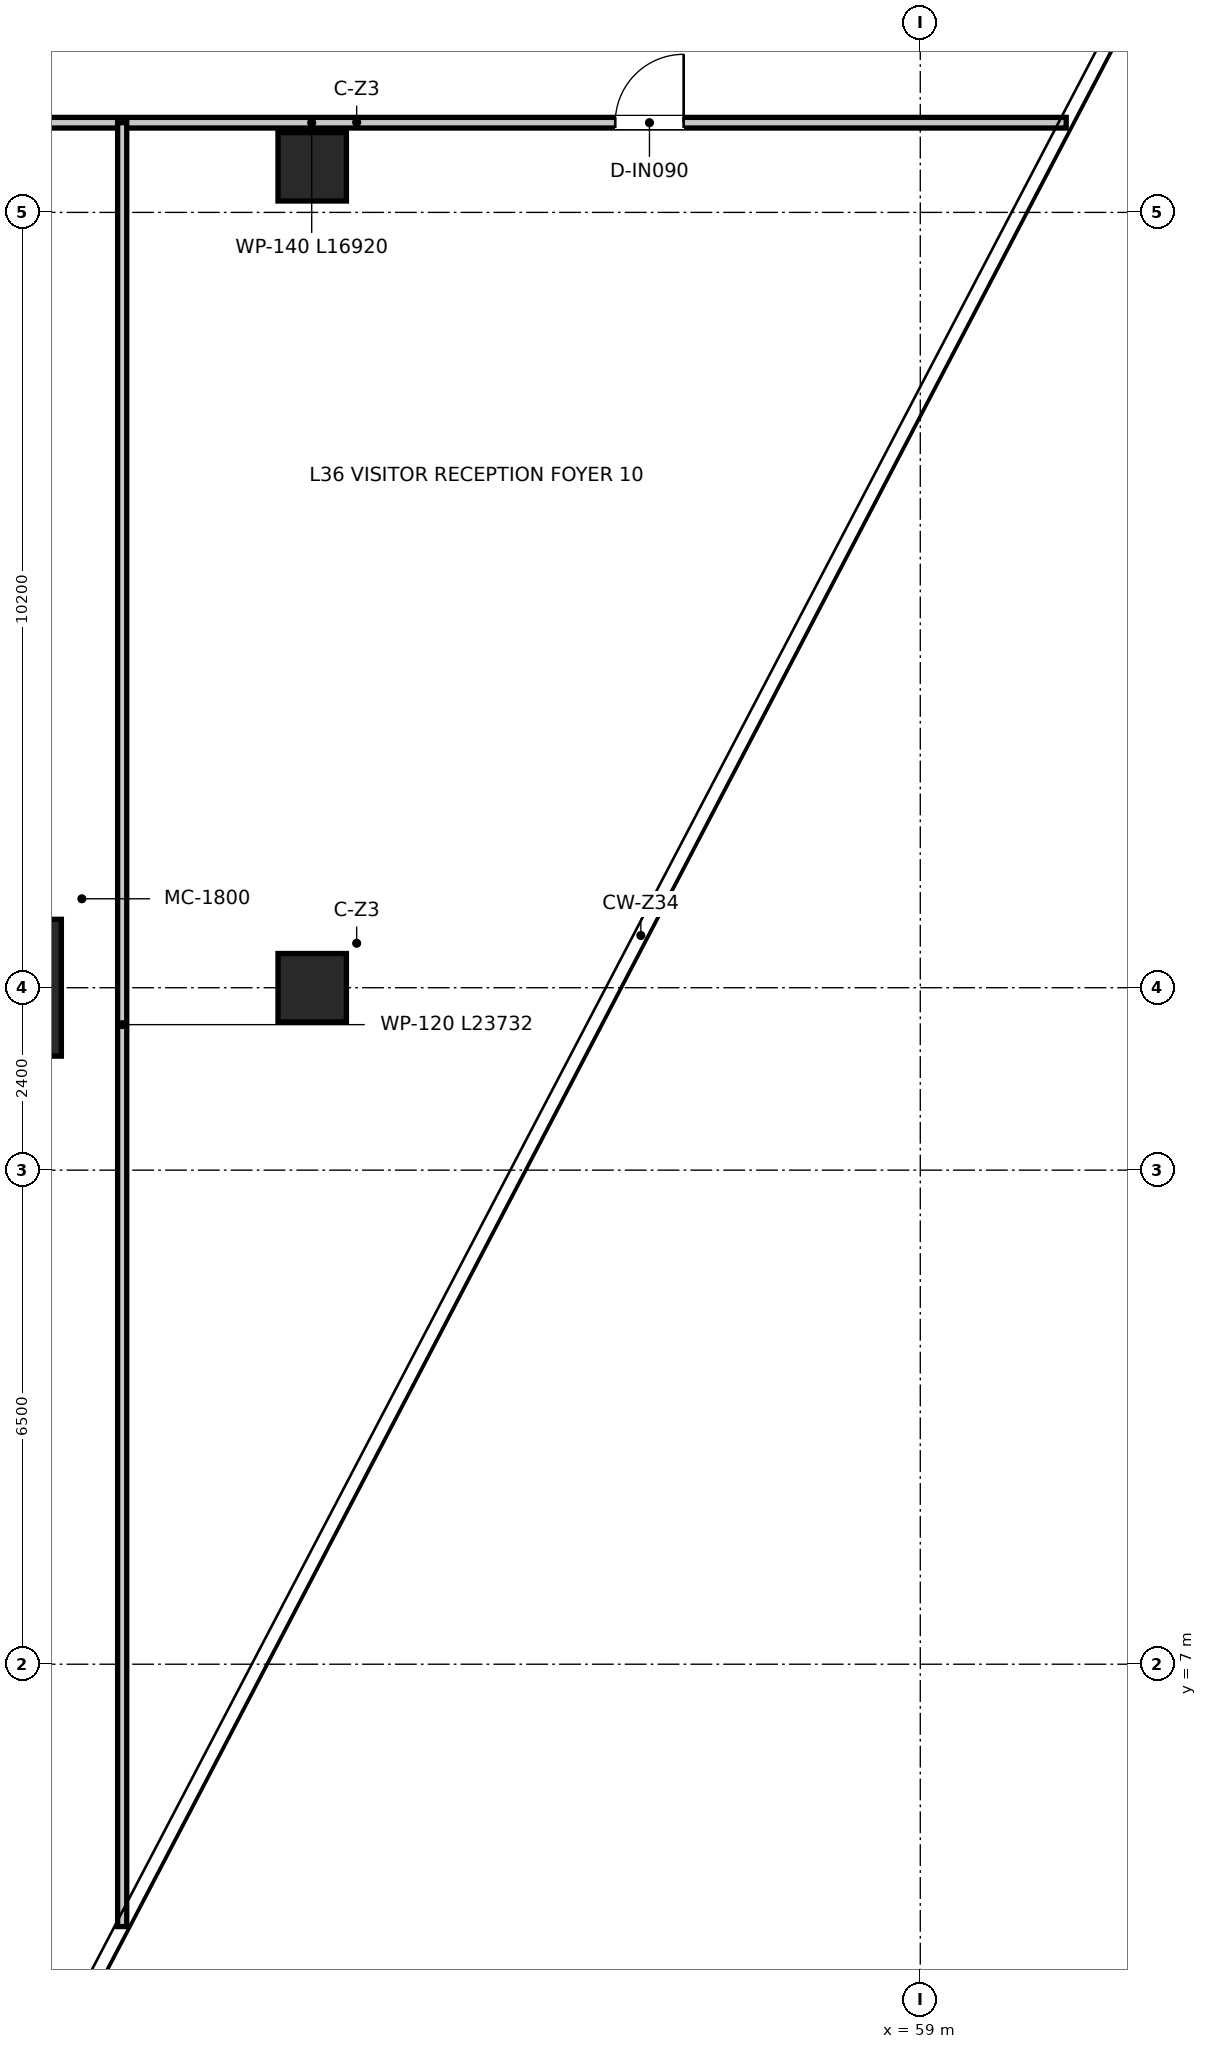
"""IFC4 building model, lengths in metres.
Left out: names, types, materials, properties, quantities, classifications, styles, units other than length and angle.
Written with IfcOpenShell. Run it as: python <this file> out.ifc"""

import sys

from ifc_helpers import new_model, si_unit, direction, frame, frame_2d, origin, origin_2d, place, context, subcontext, project, spatial, rectangle, extrude, source, transform, mapped, element, fill, save


model = new_model("IFC4")
c1 = context("Model", 3, precision=1e-05, world=origin(), true_north=direction((0.0, 1.0)))
c2 = subcontext(c1, "Body", "Model", "MODEL_VIEW")
j1 = project(units=[si_unit("LENGTHUNIT", "METRE"), si_unit("PLANEANGLEUNIT", "RADIAN")], contexts=[c1])
p1 = place(None, origin())
s1 = spatial("IfcSite", under=j1, at=p1, CompositionType="ELEMENT")
p2 = place(p1, origin())
s2 = spatial("IfcBuilding", under=s1, at=p2, CompositionType="ELEMENT")
p3 = place(p2, frame((0.0, 0.0, 150.15)))
s3 = spatial("IfcBuildingStorey", under=s2, at=p3, CompositionType="ELEMENT", Elevation=150.15)
m1 = source(origin(), c2, "Body", "SweptSolid", [
    extrude(rectangle(XDim=1.8, YDim=1.8, at=origin_2d()), origin(), (0.0, 0.0, 1.0), 3.95),
])
p4 = place(p3, frame((46.8, 15.9, 0.0), z_axis=(0.0, 0.0, 1.0), x_axis=(1.0, 0.0, 0.0)))
e1 = element("IfcColumn", 1, at=p4, inside=s3, PredefinedType="USERDEFINED", context=c2, shape_type="MappedRepresentation", body=[
    mapped(m1, transform((0.0, 0.0, 0.0), x_axis=(1.0, 0.0, 0.0), y_axis=(0.0, 1.0, 0.0), z_axis=(0.0, 0.0, 1.0), scale=1.0)),
])
m2 = source(origin(), c2, "Body", "SweptSolid", [
    extrude(rectangle(XDim=0.9, YDim=0.9, at=origin_2d()), origin(), (0.0, 0.0, 1.0), 3.95),
])
for number, where, z_axis, x_axis in (
    (2, (51.0, 26.7, 0.0), (0.0, 0.0, 1.0), (1.0, 0.0, 0.0)),
    (3, (51.0, 15.9, 0.0), (0.0, 0.0, 1.0), (1.0, 0.0, 0.0)),
):
    element("IfcColumn", number, at=place(p3, frame(where, z_axis=z_axis, x_axis=x_axis)), inside=s3, PredefinedType="COLUMN", context=c2, shape_type="MappedRepresentation", body=[
        mapped(m2, transform((0.0, 0.0, 0.0), x_axis=(1.0, 0.0, 0.0), y_axis=(0.0, 1.0, 0.0), z_axis=(0.0, 0.0, 1.0), scale=1.0)),
    ])
p5 = place(p3, frame((44.0, 27.28, 0.0), z_axis=(0.0, 0.0, 1.0), x_axis=(1.0, 0.0, 0.0)))
e4 = element("IfcWall", 4, at=p5, inside=s3, PredefinedType="PARTITIONING", context=c2, shape_type="SweptSolid", body=[
    extrude(rectangle(XDim=16.92, YDim=0.14, at=frame_2d((8.46, 0.0))), origin(), (0.0, 0.0, 1.0), 3.03),
])
p6 = place(p5, frame((2.1, 0.0, 0.0)))
e5 = element("IfcOpeningElement", 5, at=p6, cuts=e4, PredefinedType="OPENING", context=c2, shape_type="SweptSolid", body=[
    extrude(rectangle(XDim=0.9, YDim=2.1, at=frame_2d((0.45, 1.05))), frame((0.0, 0.08, 0.0), z_axis=(0.0, -1.0, 0.0), x_axis=(1.0, 0.0, 0.0)), (0.0, 0.0, 1.0), 0.16),
])
p7 = place(p5, frame((10.987, 0.0, 0.0)))
e6 = element("IfcOpeningElement", 6, at=p7, cuts=e4, PredefinedType="OPENING", context=c2, shape_type="SweptSolid", body=[
    extrude(rectangle(XDim=0.9, YDim=2.1, at=frame_2d((0.45, 1.05))), frame((0.0, 0.08, 0.0), z_axis=(0.0, -1.0, 0.0), x_axis=(1.0, 0.0, 0.0)), (0.0, 0.0, 1.0), 0.16),
])
p8 = place(p3, frame((48.5, 3.548, 0.0), z_axis=(0.0, 0.0, 1.0), x_axis=(0.0, 1.0, 0.0)))
e7 = element("IfcWall", 7, at=p8, inside=s3, PredefinedType="PARTITIONING", context=c2, shape_type="SweptSolid", body=[
    extrude(rectangle(XDim=23.732, YDim=0.12, at=frame_2d((11.866, 0.0))), origin(), (0.0, 0.0, 1.0), 3.08),
])
p9 = place(p7, origin())
e8 = element("IfcDoor", 8, at=p9, inside=s3, OperationType="SINGLE_SWING_RIGHT", PredefinedType="DOOR", context=c2, shape_type="SweptSolid", body=[
    extrude(rectangle(XDim=0.9, YDim=2.1, at=frame_2d((0.45, 1.05))), frame((0.0, 0.025, 0.0), z_axis=(0.0, -1.0, 0.0), x_axis=(1.0, 0.0, 0.0)), (0.0, 0.0, 1.0), 0.05),
])
fill(e6, e8)
save(model, sys.argv[1])
